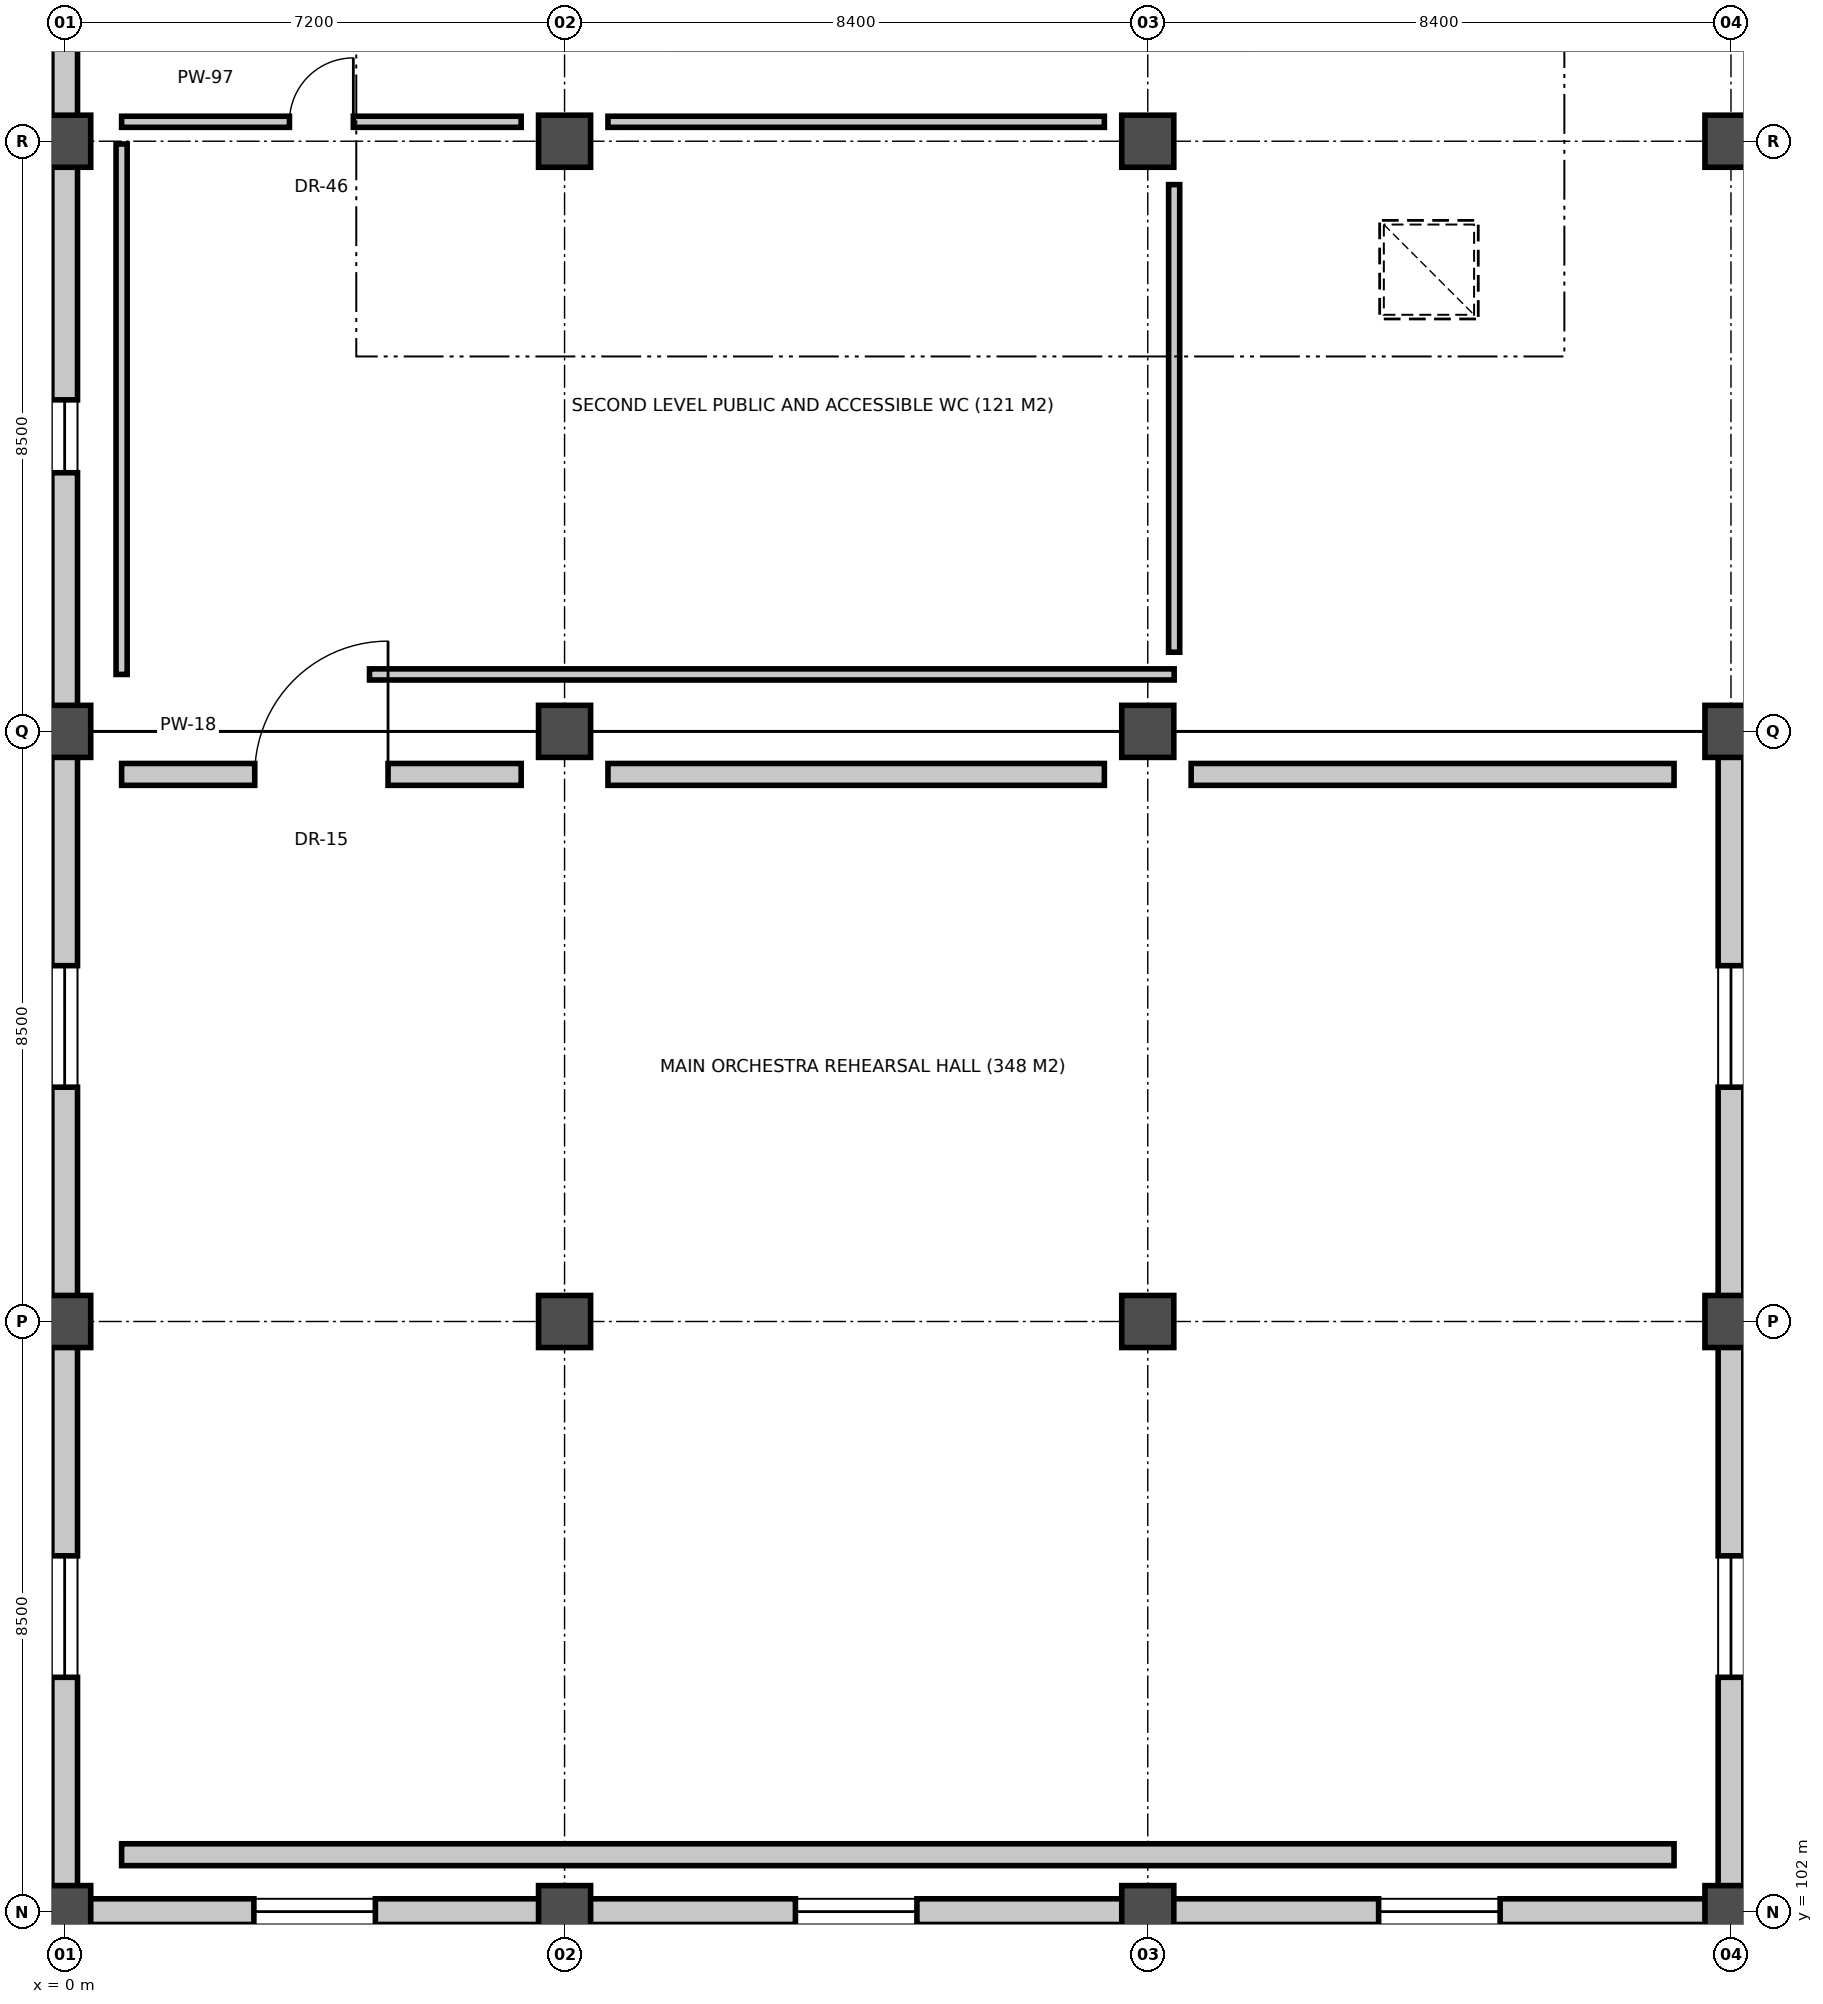
"""IFC4 building model, lengths in metres.
Left out: names, types, materials, properties, quantities, classifications, styles, units other than length and angle.
Written with IfcOpenShell. Run it as: python <this file> out.ifc"""

import sys

from ifc_helpers import new_model, si_unit, direction, frame, frame_2d, origin, origin_2d, place, context, subcontext, project, spatial, rectangle, extrude, element, fill, save


model = new_model("IFC4")
c1 = context("Model", 3, precision=1e-05, world=origin(), true_north=direction((0.0, 1.0)))
c2 = subcontext(c1, "Body", "Model", "MODEL_VIEW")
j1 = project(units=[si_unit("LENGTHUNIT", "METRE"), si_unit("PLANEANGLEUNIT", "RADIAN")], contexts=[c1])
p1 = place(None, origin())
s1 = spatial("IfcSite", under=j1, at=p1, CompositionType="ELEMENT")
p2 = place(p1, origin())
s2 = spatial("IfcBuilding", under=s1, at=p2, CompositionType="ELEMENT")
p3 = place(p2, frame((0.0, 0.0, 10.2)))
s3 = spatial("IfcBuildingStorey", under=s2, at=p3, CompositionType="ELEMENT", Elevation=10.2)
for number, where, z_axis, x_axis in (
    (1, (0.0, 102.0, 0.0), (0.0, 0.0, 1.0), (1.0, 0.0, 0.0)),
    (2, (0.0, 110.5, 0.0), (0.0, 0.0, 1.0), (1.0, 0.0, 0.0)),
    (3, (0.0, 119.0, 0.0), (0.0, 0.0, 1.0), (1.0, 0.0, 0.0)),
    (4, (0.0, 127.5, 0.0), (0.0, 0.0, 1.0), (1.0, 0.0, 0.0)),
    (5, (7.2, 102.0, 0.0), (0.0, 0.0, 1.0), (1.0, 0.0, 0.0)),
    (6, (7.2, 110.5, 0.0), (0.0, 0.0, 1.0), (1.0, 0.0, 0.0)),
    (7, (7.2, 119.0, 0.0), (0.0, 0.0, 1.0), (1.0, 0.0, 0.0)),
    (8, (7.2, 127.5, 0.0), (0.0, 0.0, 1.0), (1.0, 0.0, 0.0)),
    (9, (15.6, 102.0, 0.0), (0.0, 0.0, 1.0), (1.0, 0.0, 0.0)),
    (10, (15.6, 110.5, 0.0), (0.0, 0.0, 1.0), (1.0, 0.0, 0.0)),
    (11, (15.6, 119.0, 0.0), (0.0, 0.0, 1.0), (1.0, 0.0, 0.0)),
    (12, (15.6, 127.5, 0.0), (0.0, 0.0, 1.0), (1.0, 0.0, 0.0)),
    (13, (24.0, 102.0, 0.0), (0.0, 0.0, 1.0), (1.0, 0.0, 0.0)),
    (14, (24.0, 110.5, 0.0), (0.0, 0.0, 1.0), (1.0, 0.0, 0.0)),
    (15, (24.0, 119.0, 0.0), (0.0, 0.0, 1.0), (1.0, 0.0, 0.0)),
    (16, (24.0, 127.5, 0.0), (0.0, 0.0, 1.0), (1.0, 0.0, 0.0)),
):
    element("IfcColumn", number, at=place(p3, frame(where, z_axis=z_axis, x_axis=x_axis)), inside=s3, PredefinedType="COLUMN", context=c2, shape_type="SweptSolid", body=[
        extrude(rectangle(XDim=0.75, YDim=0.75, at=origin_2d()), origin(), (0.0, 0.0, 1.0), 4.8),
    ])
p4 = place(p3, frame((0.0, 102.355, 0.0), z_axis=(0.0, 0.0, 1.0), x_axis=(0.0, 1.0, 0.0)))
e17 = element("IfcWall", 17, at=p4, inside=s3, PredefinedType="SOLIDWALL", context=c2, shape_type="SweptSolid", body=[
    extrude(rectangle(XDim=7.79, YDim=0.37, at=frame_2d((3.895, 0.0))), origin(), (0.0, 0.0, 1.0), 3.661),
])
p5 = place(p4, frame((3.02, 0.0, 0.95)))
e18 = element("IfcOpeningElement", 18, at=p5, cuts=e17, PredefinedType="OPENING", context=c2, shape_type="SweptSolid", body=[
    extrude(rectangle(XDim=1.75, YDim=2.35, at=frame_2d((0.875, 1.175))), frame((0.0, 0.195, 0.0), z_axis=(0.0, -1.0, 0.0), x_axis=(1.0, 0.0, 0.0)), (0.0, 0.0, 1.0), 0.39),
])
p6 = place(p3, frame((0.0, 110.855, 0.0), z_axis=(0.0, 0.0, 1.0), x_axis=(0.0, 1.0, 0.0)))
e19 = element("IfcWall", 19, at=p6, inside=s3, PredefinedType="SOLIDWALL", context=c2, shape_type="SweptSolid", body=[
    extrude(rectangle(XDim=7.79, YDim=0.37, at=frame_2d((3.895, 0.0))), origin(), (0.0, 0.0, 1.0), 3.593),
])
p7 = place(p6, frame((3.02, 0.0, 0.95)))
e20 = element("IfcOpeningElement", 20, at=p7, cuts=e19, PredefinedType="OPENING", context=c2, shape_type="SweptSolid", body=[
    extrude(rectangle(XDim=1.75, YDim=2.35, at=frame_2d((0.875, 1.175))), frame((0.0, 0.195, 0.0), z_axis=(0.0, -1.0, 0.0), x_axis=(1.0, 0.0, 0.0)), (0.0, 0.0, 1.0), 0.39),
])
p8 = place(p3, frame((0.0, 119.355, 0.0), z_axis=(0.0, 0.0, 1.0), x_axis=(0.0, 1.0, 0.0)))
e21 = element("IfcWall", 21, at=p8, inside=s3, PredefinedType="SOLIDWALL", context=c2, shape_type="SweptSolid", body=[
    extrude(rectangle(XDim=7.79, YDim=0.37, at=frame_2d((3.895, 0.0))), origin(), (0.0, 0.0, 1.0), 3.518),
])
p9 = place(p8, frame((3.37, 0.0, 0.95)))
e22 = element("IfcOpeningElement", 22, at=p9, cuts=e21, PredefinedType="OPENING", context=c2, shape_type="SweptSolid", body=[
    extrude(rectangle(XDim=1.05, YDim=1.8, at=frame_2d((0.525, 0.9))), frame((0.0, 0.195, 0.0), z_axis=(0.0, -1.0, 0.0), x_axis=(1.0, 0.0, 0.0)), (0.0, 0.0, 1.0), 0.39),
])
p10 = place(p3, frame((0.0, 127.855, 0.0), z_axis=(0.0, 0.0, 1.0), x_axis=(0.0, 1.0, 0.0)))
e23 = element("IfcWall", 23, at=p10, inside=s3, PredefinedType="SOLIDWALL", context=c2, shape_type="SweptSolid", body=[
    extrude(rectangle(XDim=7.79, YDim=0.37, at=frame_2d((3.895, 0.0))), origin(), (0.0, 0.0, 1.0), 3.644),
])
p11 = place(p10, frame((3.02, 0.0, 0.95)))
e24 = element("IfcOpeningElement", 24, at=p11, cuts=e23, PredefinedType="OPENING", context=c2, shape_type="SweptSolid", body=[
    extrude(rectangle(XDim=1.75, YDim=2.35, at=frame_2d((0.875, 1.175))), frame((0.0, 0.195, 0.0), z_axis=(0.0, -1.0, 0.0), x_axis=(1.0, 0.0, 0.0)), (0.0, 0.0, 1.0), 0.39),
])
p12 = place(p3, frame((24.0, 110.145, 0.0), z_axis=(0.0, 0.0, 1.0), x_axis=(0.0, -1.0, 0.0)))
e25 = element("IfcWall", 25, at=p12, inside=s3, PredefinedType="SOLIDWALL", context=c2, shape_type="SweptSolid", body=[
    extrude(rectangle(XDim=7.79, YDim=0.37, at=frame_2d((3.895, 0.0))), origin(), (0.0, 0.0, 1.0), 3.62),
])
p13 = place(p12, frame((3.02, 0.0, 0.95)))
e26 = element("IfcOpeningElement", 26, at=p13, cuts=e25, PredefinedType="OPENING", context=c2, shape_type="SweptSolid", body=[
    extrude(rectangle(XDim=1.75, YDim=2.35, at=frame_2d((0.875, 1.175))), frame((0.0, 0.195, 0.0), z_axis=(0.0, -1.0, 0.0), x_axis=(1.0, 0.0, 0.0)), (0.0, 0.0, 1.0), 0.39),
])
p14 = place(p3, frame((24.0, 118.645, 0.0), z_axis=(0.0, 0.0, 1.0), x_axis=(0.0, -1.0, 0.0)))
e27 = element("IfcWall", 27, at=p14, inside=s3, PredefinedType="SOLIDWALL", context=c2, shape_type="SweptSolid", body=[
    extrude(rectangle(XDim=7.79, YDim=0.37, at=frame_2d((3.895, 0.0))), origin(), (0.0, 0.0, 1.0), 3.912),
])
p15 = place(p14, frame((3.02, 0.0, 0.95)))
e28 = element("IfcOpeningElement", 28, at=p15, cuts=e27, PredefinedType="OPENING", context=c2, shape_type="SweptSolid", body=[
    extrude(rectangle(XDim=1.75, YDim=2.35, at=frame_2d((0.875, 1.175))), frame((0.0, 0.195, 0.0), z_axis=(0.0, -1.0, 0.0), x_axis=(1.0, 0.0, 0.0)), (0.0, 0.0, 1.0), 0.39),
])
p16 = place(p3, frame((6.845, 102.0, 0.0), z_axis=(0.0, 0.0, 1.0), x_axis=(-1.0, 0.0, 0.0)))
e29 = element("IfcWall", 29, at=p16, inside=s3, PredefinedType="SOLIDWALL", context=c2, shape_type="SweptSolid", body=[
    extrude(rectangle(XDim=6.49, YDim=0.37, at=frame_2d((3.245, 0.0))), origin(), (0.0, 0.0, 1.0), 3.971),
])
p17 = place(p16, frame((2.37, 0.0, 0.95)))
e30 = element("IfcOpeningElement", 30, at=p17, cuts=e29, PredefinedType="OPENING", context=c2, shape_type="SweptSolid", body=[
    extrude(rectangle(XDim=1.75, YDim=2.35, at=frame_2d((0.875, 1.175))), frame((0.0, 0.195, 0.0), z_axis=(0.0, -1.0, 0.0), x_axis=(1.0, 0.0, 0.0)), (0.0, 0.0, 1.0), 0.39),
])
p18 = place(p3, frame((15.245, 102.0, 0.0), z_axis=(0.0, 0.0, 1.0), x_axis=(-1.0, 0.0, 0.0)))
e31 = element("IfcWall", 31, at=p18, inside=s3, PredefinedType="SOLIDWALL", context=c2, shape_type="SweptSolid", body=[
    extrude(rectangle(XDim=7.69, YDim=0.37, at=frame_2d((3.845, 0.0))), origin(), (0.0, 0.0, 1.0), 3.827),
])
p19 = place(p18, frame((2.97, 0.0, 0.95)))
e32 = element("IfcOpeningElement", 32, at=p19, cuts=e31, PredefinedType="OPENING", context=c2, shape_type="SweptSolid", body=[
    extrude(rectangle(XDim=1.75, YDim=2.35, at=frame_2d((0.875, 1.175))), frame((0.0, 0.195, 0.0), z_axis=(0.0, -1.0, 0.0), x_axis=(1.0, 0.0, 0.0)), (0.0, 0.0, 1.0), 0.39),
])
p20 = place(p3, frame((23.645, 102.0, 0.0), z_axis=(0.0, 0.0, 1.0), x_axis=(-1.0, 0.0, 0.0)))
e33 = element("IfcWall", 33, at=p20, inside=s3, PredefinedType="SOLIDWALL", context=c2, shape_type="SweptSolid", body=[
    extrude(rectangle(XDim=7.69, YDim=0.37, at=frame_2d((3.845, 0.0))), origin(), (0.0, 0.0, 1.0), 3.75),
])
p21 = place(p20, frame((2.97, 0.0, 0.95)))
e34 = element("IfcOpeningElement", 34, at=p21, cuts=e33, PredefinedType="OPENING", context=c2, shape_type="SweptSolid", body=[
    extrude(rectangle(XDim=1.75, YDim=2.35, at=frame_2d((0.875, 1.175))), frame((0.0, 0.195, 0.0), z_axis=(0.0, -1.0, 0.0), x_axis=(1.0, 0.0, 0.0)), (0.0, 0.0, 1.0), 0.39),
])
p22 = place(p3, frame((0.82, 118.38, 0.0), z_axis=(0.0, 0.0, 1.0), x_axis=(1.0, 0.0, 0.0)))
e35 = element("IfcWall", 35, at=p22, inside=s3, PredefinedType="PARTITIONING", context=c2, shape_type="SweptSolid", body=[
    extrude(rectangle(XDim=5.755, YDim=0.315, at=frame_2d((2.877, 0.0))), origin(), (0.0, 0.0, 1.0), 3.46),
])
p23 = place(p22, frame((1.917, 0.0, 0.0)))
e36 = element("IfcOpeningElement", 36, at=p23, cuts=e35, PredefinedType="OPENING", context=c2, shape_type="SweptSolid", body=[
    extrude(rectangle(XDim=1.92, YDim=2.42, at=frame_2d((0.96, 1.21))), frame((0.0, 0.167, 0.0), z_axis=(0.0, -1.0, 0.0), x_axis=(1.0, 0.0, 0.0)), (0.0, 0.0, 1.0), 0.335),
])
p24 = place(p3, frame((7.825, 118.38, 0.0), z_axis=(0.0, 0.0, 1.0), x_axis=(1.0, 0.0, 0.0)))
e37 = element("IfcWall", 37, at=p24, inside=s3, PredefinedType="PARTITIONING", context=c2, shape_type="SweptSolid", body=[
    extrude(rectangle(XDim=7.15, YDim=0.315, at=frame_2d((3.575, 0.0))), origin(), (0.0, 0.0, 1.0), 3.46),
])
p25 = place(p3, frame((16.225, 118.38, 0.0), z_axis=(0.0, 0.0, 1.0), x_axis=(1.0, 0.0, 0.0)))
e38 = element("IfcWall", 38, at=p25, inside=s3, PredefinedType="PARTITIONING", context=c2, shape_type="SweptSolid", body=[
    extrude(rectangle(XDim=6.955, YDim=0.315, at=frame_2d((3.478, 0.0))), origin(), (0.0, 0.0, 1.0), 3.46),
])
p26 = place(p3, frame((23.18, 102.82, 0.0), z_axis=(0.0, 0.0, 1.0), x_axis=(-1.0, 0.0, 0.0)))
e39 = element("IfcWall", 39, at=p26, inside=s3, PredefinedType="PARTITIONING", context=c2, shape_type="SweptSolid", body=[
    extrude(rectangle(XDim=22.36, YDim=0.315, at=frame_2d((11.18, 0.0))), origin(), (0.0, 0.0, 1.0), 3.46),
])
p27 = place(p3, frame((0.82, 127.78, 0.0), z_axis=(0.0, 0.0, 1.0), x_axis=(1.0, 0.0, 0.0)))
e40 = element("IfcWall", 40, at=p27, inside=s3, PredefinedType="PARTITIONING", context=c2, shape_type="SweptSolid", body=[
    extrude(rectangle(XDim=5.755, YDim=0.16, at=frame_2d((2.877, 0.0))), origin(), (0.0, 0.0, 1.0), 3.46),
])
p28 = place(p27, frame((2.417, 0.0, 0.0)))
e41 = element("IfcOpeningElement", 41, at=p28, cuts=e40, PredefinedType="OPENING", context=c2, shape_type="SweptSolid", body=[
    extrude(rectangle(XDim=0.92, YDim=2.12, at=frame_2d((0.46, 1.06))), frame((0.0, 0.09, 0.0), z_axis=(0.0, -1.0, 0.0), x_axis=(1.0, 0.0, 0.0)), (0.0, 0.0, 1.0), 0.18),
])
p29 = place(p3, frame((7.825, 127.78, 0.0), z_axis=(0.0, 0.0, 1.0), x_axis=(1.0, 0.0, 0.0)))
e42 = element("IfcWall", 42, at=p29, inside=s3, PredefinedType="PARTITIONING", context=c2, shape_type="SweptSolid", body=[
    extrude(rectangle(XDim=7.15, YDim=0.16, at=frame_2d((3.575, 0.0))), origin(), (0.0, 0.0, 1.0), 3.46),
])
p30 = place(p3, frame((15.98, 119.82, 0.0), z_axis=(0.0, 0.0, 1.0), x_axis=(-1.0, 0.0, 0.0)))
e43 = element("IfcWall", 43, at=p30, inside=s3, PredefinedType="PARTITIONING", context=c2, shape_type="SweptSolid", body=[
    extrude(rectangle(XDim=11.589, YDim=0.16, at=frame_2d((5.795, 0.0))), origin(), (0.0, 0.0, 1.0), 3.46),
])
p31 = place(p3, frame((15.98, 126.875, 0.0), z_axis=(0.0, 0.0, 1.0), x_axis=(0.0, -1.0, 0.0)))
e44 = element("IfcWall", 44, at=p31, inside=s3, PredefinedType="PARTITIONING", context=c2, shape_type="SweptSolid", body=[
    extrude(rectangle(XDim=6.735, YDim=0.16, at=frame_2d((3.368, 0.0))), origin(), (0.0, 0.0, 1.0), 3.46),
])
p32 = place(p3, frame((0.82, 119.82, 0.0), z_axis=(0.0, 0.0, 1.0), x_axis=(0.0, 1.0, 0.0)))
e45 = element("IfcWall", 45, at=p32, inside=s3, PredefinedType="PARTITIONING", context=c2, shape_type="SweptSolid", body=[
    extrude(rectangle(XDim=7.64, YDim=0.16, at=frame_2d((3.82, 0.0))), origin(), (0.0, 0.0, 1.0), 3.46),
])
p33 = place(p5, origin())
e46 = element("IfcWindow", 46, at=p33, inside=s3, PartitioningType="SINGLE_PANEL", PredefinedType="WINDOW", context=c2, shape_type="SweptSolid", body=[
    extrude(rectangle(XDim=1.75, YDim=2.35, at=frame_2d((0.875, 1.175))), frame((0.0, 0.03, 0.0), z_axis=(0.0, -1.0, 0.0), x_axis=(1.0, 0.0, 0.0)), (0.0, 0.0, 1.0), 0.06),
])
fill(e18, e46)
p34 = place(p7, origin())
e47 = element("IfcWindow", 47, at=p34, inside=s3, PartitioningType="SINGLE_PANEL", PredefinedType="WINDOW", context=c2, shape_type="SweptSolid", body=[
    extrude(rectangle(XDim=1.75, YDim=2.35, at=frame_2d((0.875, 1.175))), frame((0.0, 0.03, 0.0), z_axis=(0.0, -1.0, 0.0), x_axis=(1.0, 0.0, 0.0)), (0.0, 0.0, 1.0), 0.06),
])
fill(e20, e47)
p35 = place(p9, origin())
e48 = element("IfcWindow", 48, at=p35, inside=s3, PartitioningType="SINGLE_PANEL", PredefinedType="WINDOW", context=c2, shape_type="SweptSolid", body=[
    extrude(rectangle(XDim=1.05, YDim=1.8, at=frame_2d((0.525, 0.9))), frame((0.0, 0.03, 0.0), z_axis=(0.0, -1.0, 0.0), x_axis=(1.0, 0.0, 0.0)), (0.0, 0.0, 1.0), 0.06),
])
fill(e22, e48)
p36 = place(p13, origin())
e49 = element("IfcWindow", 49, at=p36, inside=s3, PartitioningType="SINGLE_PANEL", PredefinedType="WINDOW", context=c2, shape_type="SweptSolid", body=[
    extrude(rectangle(XDim=1.75, YDim=2.35, at=frame_2d((0.875, 1.175))), frame((0.0, 0.03, 0.0), z_axis=(0.0, -1.0, 0.0), x_axis=(1.0, 0.0, 0.0)), (0.0, 0.0, 1.0), 0.06),
])
fill(e26, e49)
p37 = place(p15, origin())
e50 = element("IfcWindow", 50, at=p37, inside=s3, PartitioningType="SINGLE_PANEL", PredefinedType="WINDOW", context=c2, shape_type="SweptSolid", body=[
    extrude(rectangle(XDim=1.75, YDim=2.35, at=frame_2d((0.875, 1.175))), frame((0.0, 0.03, 0.0), z_axis=(0.0, -1.0, 0.0), x_axis=(1.0, 0.0, 0.0)), (0.0, 0.0, 1.0), 0.06),
])
fill(e28, e50)
p38 = place(p17, origin())
e51 = element("IfcWindow", 51, at=p38, inside=s3, PartitioningType="SINGLE_PANEL", PredefinedType="WINDOW", context=c2, shape_type="SweptSolid", body=[
    extrude(rectangle(XDim=1.75, YDim=2.35, at=frame_2d((0.875, 1.175))), frame((0.0, 0.03, 0.0), z_axis=(0.0, -1.0, 0.0), x_axis=(1.0, 0.0, 0.0)), (0.0, 0.0, 1.0), 0.06),
])
fill(e30, e51)
p39 = place(p19, origin())
e52 = element("IfcWindow", 52, at=p39, inside=s3, PartitioningType="SINGLE_PANEL", PredefinedType="WINDOW", context=c2, shape_type="SweptSolid", body=[
    extrude(rectangle(XDim=1.75, YDim=2.35, at=frame_2d((0.875, 1.175))), frame((0.0, 0.03, 0.0), z_axis=(0.0, -1.0, 0.0), x_axis=(1.0, 0.0, 0.0)), (0.0, 0.0, 1.0), 0.06),
])
fill(e32, e52)
p40 = place(p21, origin())
e53 = element("IfcWindow", 53, at=p40, inside=s3, PartitioningType="SINGLE_PANEL", PredefinedType="WINDOW", context=c2, shape_type="SweptSolid", body=[
    extrude(rectangle(XDim=1.75, YDim=2.35, at=frame_2d((0.875, 1.175))), frame((0.0, 0.03, 0.0), z_axis=(0.0, -1.0, 0.0), x_axis=(1.0, 0.0, 0.0)), (0.0, 0.0, 1.0), 0.06),
])
fill(e34, e53)
p41 = place(p23, origin())
e54 = element("IfcDoor", 54, at=p41, inside=s3, OperationType="SINGLE_SWING_RIGHT", PredefinedType="DOOR", context=c2, shape_type="SweptSolid", body=[
    extrude(rectangle(XDim=1.92, YDim=2.42, at=frame_2d((0.96, 1.21))), frame((0.0, 0.025, 0.0), z_axis=(0.0, -1.0, 0.0), x_axis=(1.0, 0.0, 0.0)), (0.0, 0.0, 1.0), 0.05),
])
fill(e36, e54)
p42 = place(p28, origin())
e55 = element("IfcDoor", 55, at=p42, inside=s3, OperationType="SINGLE_SWING_RIGHT", PredefinedType="DOOR", context=c2, shape_type="SweptSolid", body=[
    extrude(rectangle(XDim=0.92, YDim=2.12, at=frame_2d((0.46, 1.06))), frame((0.0, 0.025, 0.0), z_axis=(0.0, -1.0, 0.0), x_axis=(1.0, 0.0, 0.0)), (0.0, 0.0, 1.0), 0.05),
])
fill(e41, e55)
save(model, sys.argv[1])
